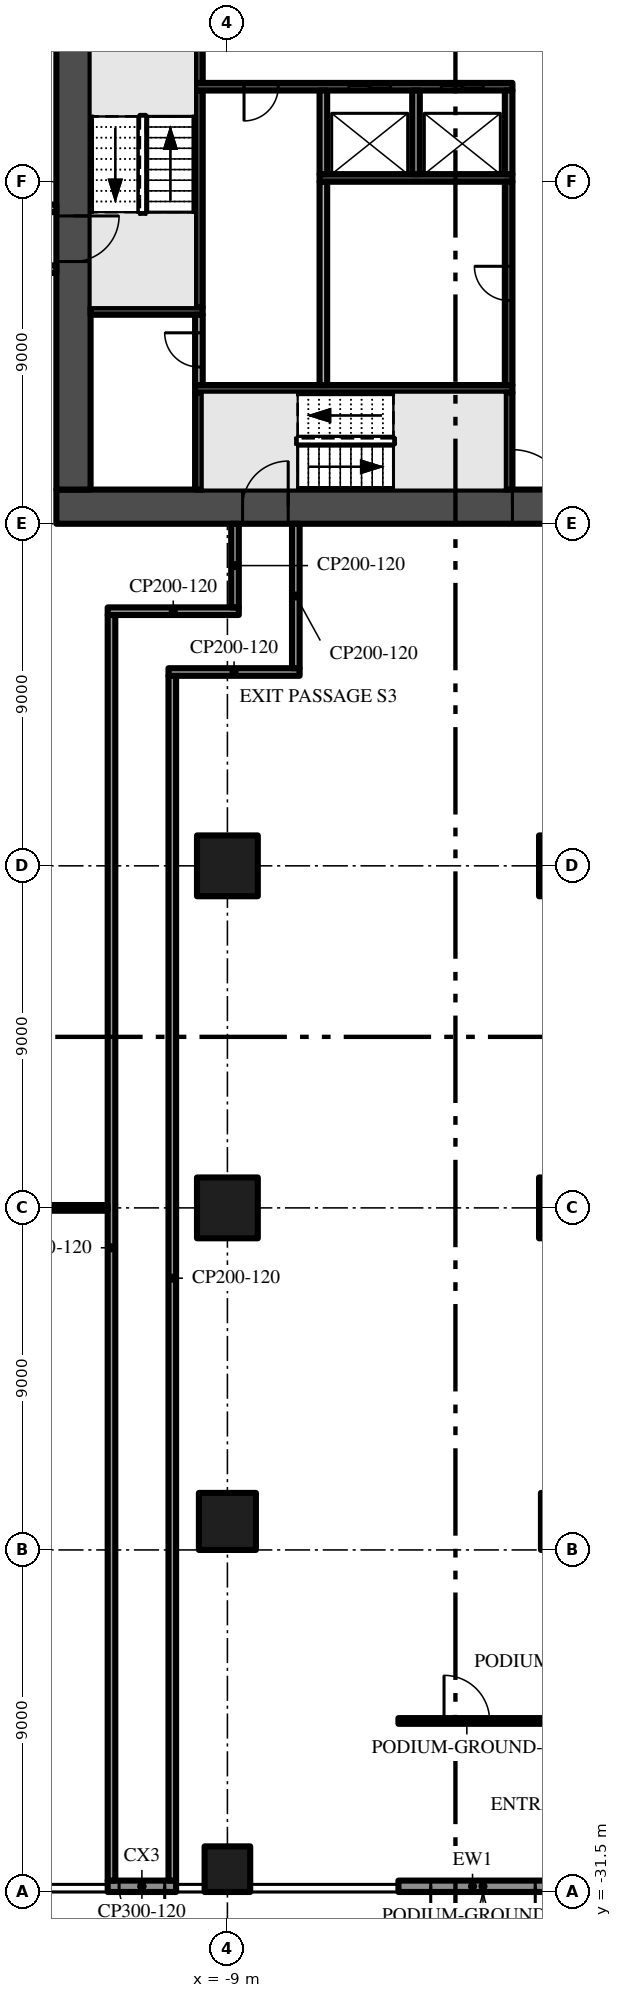
"""IFC4 building model, lengths in metres.
Left out: names, types, materials, properties, quantities, classifications, styles, units other than length and angle.
Written with IfcOpenShell. Run it as: python <this file> out.ifc"""

import sys

from ifc_helpers import new_model, si_unit, direction, frame, frame_2d, origin, origin_2d, place, context, subcontext, project, spatial, rectangle, extrude, element, fill, save


model = new_model("IFC4")
c1 = context("Model", 3, precision=1e-05, world=origin(), true_north=direction((0.0, 1.0)))
c2 = subcontext(c1, "Body", "Model", "MODEL_VIEW")
j1 = project(units=[si_unit("LENGTHUNIT", "METRE"), si_unit("PLANEANGLEUNIT", "RADIAN")], contexts=[c1])
p1 = place(None, origin())
s1 = spatial("IfcSite", under=j1, at=p1, CompositionType="ELEMENT")
p2 = place(p1, origin())
s2 = spatial("IfcBuilding", under=s1, at=p2, CompositionType="ELEMENT")
p3 = place(p2, origin())
s3 = spatial("IfcBuildingStorey", under=s2, at=p3, CompositionType="ELEMENT", Elevation=0.0)
p4 = place(p3, frame((-13.5, 4.95, -2.2), z_axis=(0.0, 0.0, 1.0), x_axis=(1.0, 0.0, 0.0)))
e1 = element("IfcWall", 1, at=p4, inside=s3, PredefinedType="SHEAR", context=c2, shape_type="SweptSolid", body=[
    extrude(rectangle(XDim=27.0, YDim=0.9, at=frame_2d((13.5, 0.0))), origin(), (0.0, 0.0, 1.0), 7.8),
])
p5 = place(p4, frame((12.0, 0.0, 2.2)))
e2 = element("IfcOpeningElement", 2, at=p5, cuts=e1, PredefinedType="OPENING", context=c2, shape_type="SweptSolid", body=[
    extrude(rectangle(XDim=3.0, YDim=2.4, at=frame_2d((1.5, 1.2))), frame((0.0, 0.46, 0.0), z_axis=(0.0, -1.0, 0.0), x_axis=(1.0, 0.0, 0.0)), (0.0, 0.0, 1.0), 0.92),
])
p6 = place(p4, frame((4.9, 0.0, 2.2)))
e3 = element("IfcOpeningElement", 3, at=p6, cuts=e1, PredefinedType="OPENING", context=c2, shape_type="SweptSolid", body=[
    extrude(rectangle(XDim=1.2, YDim=2.2, at=frame_2d((0.6, 1.1))), frame((0.0, 0.46, 0.0), z_axis=(0.0, -1.0, 0.0), x_axis=(1.0, 0.0, 0.0)), (0.0, 0.0, 1.0), 0.92),
])
p7 = place(p4, frame((20.75, 0.0, 2.2)))
e4 = element("IfcOpeningElement", 4, at=p7, cuts=e1, PredefinedType="OPENING", context=c2, shape_type="SweptSolid", body=[
    extrude(rectangle(XDim=1.5, YDim=2.2, at=frame_2d((0.75, 1.1))), frame((0.0, 0.46, 0.0), z_axis=(0.0, -1.0, 0.0), x_axis=(1.0, 0.0, 0.0)), (0.0, 0.0, 1.0), 0.92),
])
p8 = place(p4, frame((17.4, 0.0, 2.2)))
e5 = element("IfcOpeningElement", 5, at=p8, cuts=e1, PredefinedType="OPENING", context=c2, shape_type="SweptSolid", body=[
    extrude(rectangle(XDim=1.2, YDim=2.2, at=frame_2d((0.6, 1.1))), frame((0.0, 0.46, 0.0), z_axis=(0.0, -1.0, 0.0), x_axis=(1.0, 0.0, 0.0)), (0.0, 0.0, 1.0), 0.92),
])
p9 = place(p3, frame((-13.05, 21.6, -2.2), z_axis=(0.0, 0.0, 1.0), x_axis=(0.0, -1.0, 0.0)))
e6 = element("IfcWall", 6, at=p9, inside=s3, PredefinedType="SHEAR", context=c2, shape_type="SweptSolid", body=[
    extrude(rectangle(XDim=16.2, YDim=0.9, at=frame_2d((8.1, 0.0))), origin(), (0.0, 0.0, 1.0), 7.8),
])
p10 = place(p9, frame((9.0, 0.0, 2.2)))
e7 = element("IfcOpeningElement", 7, at=p10, cuts=e6, PredefinedType="OPENING", context=c2, shape_type="SweptSolid", body=[
    extrude(rectangle(XDim=1.2, YDim=2.2, at=frame_2d((0.6, 1.1))), frame((0.0, 0.46, 0.0), z_axis=(0.0, -1.0, 0.0), x_axis=(1.0, 0.0, 0.0)), (0.0, 0.0, 1.0), 0.92),
])
p11 = place(p3, frame((-9.0, -30.9, 0.0), z_axis=(0.0, 0.0, 1.0), x_axis=(1.0, 0.0, 0.0)))
e8 = element("IfcColumn", 8, at=p11, inside=s3, PredefinedType="COLUMN", context=c2, shape_type="SweptSolid", body=[
    extrude(rectangle(XDim=1.2, YDim=1.2, at=origin_2d()), origin(), (0.0, 0.0, 1.0), 5.6),
])
p12 = place(p3, frame((-9.0, -13.5, 0.0), z_axis=(0.0, 0.0, 1.0), x_axis=(1.0, 0.0, 0.0)))
e9 = element("IfcColumn", 9, at=p12, inside=s3, PredefinedType="COLUMN", context=c2, shape_type="SweptSolid", body=[
    extrude(rectangle(XDim=1.6, YDim=1.6, at=origin_2d()), origin(), (0.0, 0.0, 1.0), 5.6),
])
p13 = place(p3, frame((-9.0, -21.75, 0.0), z_axis=(0.0, 0.0, 1.0), x_axis=(1.0, 0.0, 0.0)))
e10 = element("IfcColumn", 10, at=p13, inside=s3, PredefinedType="COLUMN", context=c2, shape_type="SweptSolid", body=[
    extrude(rectangle(XDim=1.5, YDim=1.5, at=origin_2d()), origin(), (0.0, 0.0, 1.0), 5.6),
])
for number, where, z_axis, x_axis in (
    (11, (-9.0, -4.5, 0.0), (0.0, 0.0, 1.0), (1.0, 0.0, 0.0)),
    (12, (0.0, -13.5, 0.0), (0.0, 0.0, 1.0), (1.0, 0.0, 0.0)),
):
    element("IfcColumn", number, at=place(p3, frame(where, z_axis=z_axis, x_axis=x_axis)), inside=s3, PredefinedType="COLUMN", context=c2, shape_type="SweptSolid", body=[
        extrude(rectangle(XDim=1.6, YDim=1.6, at=origin_2d()), origin(), (0.0, 0.0, 1.0), 5.6),
    ])
p14 = place(p3, frame((0.0, -21.75, 0.0), z_axis=(0.0, 0.0, 1.0), x_axis=(1.0, 0.0, 0.0)))
e13 = element("IfcColumn", 13, at=p14, inside=s3, PredefinedType="COLUMN", context=c2, shape_type="SweptSolid", body=[
    extrude(rectangle(XDim=1.5, YDim=1.5, at=origin_2d()), origin(), (0.0, 0.0, 1.0), 5.6),
])
p15 = place(p3, frame((0.0, -4.5, 0.0), z_axis=(0.0, 0.0, 1.0), x_axis=(1.0, 0.0, 0.0)))
e14 = element("IfcColumn", 14, at=p15, inside=s3, PredefinedType="COLUMN", context=c2, shape_type="SweptSolid", body=[
    extrude(rectangle(XDim=1.6, YDim=1.6, at=origin_2d()), origin(), (0.0, 0.0, 1.0), 5.6),
])
p16 = place(p3, frame((-0.6, -31.35, 0.0), z_axis=(0.0, 0.0, 1.0), x_axis=(-1.0, 0.0, 0.0)))
e15 = element("IfcWall", 15, at=p16, inside=s3, PredefinedType="SOLIDWALL", context=c2, shape_type="SweptSolid", body=[
    extrude(rectangle(XDim=3.9, YDim=0.3, at=frame_2d((1.95, 0.0))), origin(), (0.0, 0.0, 1.0), 5.6),
])
p17 = place(p16, frame((0.3, 0.0, 0.0)))
e16 = element("IfcOpeningElement", 16, at=p17, cuts=e15, PredefinedType="OPENING", context=c2, shape_type="SweptSolid", body=[
    extrude(rectangle(XDim=2.75, YDim=2.7, at=frame_2d((1.375, 1.35))), frame((0.0, 0.16, 0.0), z_axis=(0.0, -1.0, 0.0), x_axis=(1.0, 0.0, 0.0)), (0.0, 0.0, 1.0), 0.32),
])
p18 = place(p3, frame((-12.6, 10.1, -0.4), z_axis=(0.0, 0.0, 1.0), x_axis=(1.0, 0.0, 0.0)))
e17 = element("IfcWall", 17, at=p18, inside=s3, PredefinedType="SHEAR", context=c2, shape_type="SweptSolid", body=[
    extrude(rectangle(XDim=2.95, YDim=0.2, at=frame_2d((1.475, 0.0))), origin(), (0.0, 0.0, 1.0), 6.0),
])
p19 = place(p3, frame((-9.75, 5.4, -0.4), z_axis=(0.0, 0.0, 1.0), x_axis=(0.0, 1.0, 0.0)))
e18 = element("IfcWall", 18, at=p19, inside=s3, PredefinedType="SHEAR", context=c2, shape_type="SweptSolid", body=[
    extrude(rectangle(XDim=2.55, YDim=0.2, at=frame_2d((1.275, 0.0))), origin(), (0.0, 0.0, 1.0), 6.0),
])
p20 = place(p3, frame((-9.85, 8.05, -0.4), z_axis=(0.0, 0.0, 1.0), x_axis=(1.0, 0.0, 0.0)))
e19 = element("IfcWall", 19, at=p20, inside=s3, PredefinedType="SHEAR", context=c2, shape_type="SweptSolid", body=[
    extrude(rectangle(XDim=8.35, YDim=0.2, at=frame_2d((4.175, 0.0))), origin(), (0.0, 0.0, 1.0), 6.0),
])
p21 = place(p3, frame((-9.75, 8.15, 0.0), z_axis=(0.0, 0.0, 1.0), x_axis=(0.0, 1.0, 0.0)))
e20 = element("IfcWall", 20, at=p21, inside=s3, PredefinedType="PARTITIONING", context=c2, shape_type="SweptSolid", body=[
    extrude(rectangle(XDim=1.85, YDim=0.2, at=frame_2d((0.925, 0.0))), origin(), (0.0, 0.0, 1.0), 5.6),
])
p22 = place(p21, frame((0.475, 0.0, 0.0)))
e21 = element("IfcOpeningElement", 21, at=p22, cuts=e20, PredefinedType="OPENING", context=c2, shape_type="SweptSolid", body=[
    extrude(rectangle(XDim=0.9, YDim=2.1, at=frame_2d((0.45, 1.05))), frame((0.0, 0.11, 0.0), z_axis=(0.0, -1.0, 0.0), x_axis=(1.0, 0.0, 0.0)), (0.0, 0.0, 1.0), 0.22),
])
p23 = place(p3, frame((-9.75, 10.2, -0.4), z_axis=(0.0, 0.0, 1.0), x_axis=(0.0, 1.0, 0.0)))
e22 = element("IfcWall", 22, at=p23, inside=s3, PredefinedType="SHEAR", context=c2, shape_type="SweptSolid", body=[
    extrude(rectangle(XDim=5.7, YDim=0.2, at=frame_2d((2.85, 0.0))), origin(), (0.0, 0.0, 1.0), 6.0),
])
p24 = place(p3, frame((-1.5, 16.0, -0.4), z_axis=(0.0, 0.0, 1.0), x_axis=(-1.0, 0.0, 0.0)))
e23 = element("IfcWall", 23, at=p24, inside=s3, PredefinedType="SHEAR", context=c2, shape_type="SweptSolid", body=[
    extrude(rectangle(XDim=8.35, YDim=0.2, at=frame_2d((4.175, 0.0))), origin(), (0.0, 0.0, 1.0), 6.0),
])
p25 = place(p24, frame((3.206, 0.0, 0.4)))
e24 = element("IfcOpeningElement", 24, at=p25, cuts=e23, PredefinedType="OPENING", context=c2, shape_type="SweptSolid", body=[
    extrude(rectangle(XDim=1.1, YDim=2.1, at=frame_2d((0.55, 1.05))), frame((0.0, 0.11, 0.0), z_axis=(0.0, -1.0, 0.0), x_axis=(1.0, 0.0, 0.0)), (0.0, 0.0, 1.0), 0.22),
])
p26 = place(p24, frame((0.769, 0.0, 0.4)))
e25 = element("IfcOpeningElement", 25, at=p26, cuts=e23, PredefinedType="OPENING", context=c2, shape_type="SweptSolid", body=[
    extrude(rectangle(XDim=1.1, YDim=2.1, at=frame_2d((0.55, 1.05))), frame((0.0, 0.11, 0.0), z_axis=(0.0, -1.0, 0.0), x_axis=(1.0, 0.0, 0.0)), (0.0, 0.0, 1.0), 0.22),
])
p27 = place(p24, frame((6.162, 0.0, 0.4)))
e26 = element("IfcOpeningElement", 26, at=p27, cuts=e23, PredefinedType="OPENING", context=c2, shape_type="SweptSolid", body=[
    extrude(rectangle(XDim=0.9, YDim=2.1, at=frame_2d((0.45, 1.05))), frame((0.0, 0.11, 0.0), z_axis=(0.0, -1.0, 0.0), x_axis=(1.0, 0.0, 0.0)), (0.0, 0.0, 1.0), 0.22),
])
p28 = place(p3, frame((-9.75, 16.1, -0.4), z_axis=(0.0, 0.0, 1.0), x_axis=(0.0, 1.0, 0.0)))
e27 = element("IfcWall", 27, at=p28, inside=s3, PredefinedType="SHEAR", context=c2, shape_type="SweptSolid", body=[
    extrude(rectangle(XDim=1.5, YDim=0.2, at=frame_2d((0.75, 0.0))), origin(), (0.0, 0.0, 1.0), 6.0),
])
p29 = place(p3, frame((-6.475, 8.15, 0.0), z_axis=(0.0, 0.0, 1.0), x_axis=(0.0, 1.0, 0.0)))
e28 = element("IfcWall", 28, at=p29, inside=s3, PredefinedType="PARTITIONING", context=c2, shape_type="SweptSolid", body=[
    extrude(rectangle(XDim=5.35, YDim=0.2, at=frame_2d((2.675, 0.0))), origin(), (0.0, 0.0, 1.0), 5.6),
])
p30 = place(p3, frame((-6.575, 13.6, -0.4), z_axis=(0.0, 0.0, 1.0), x_axis=(1.0, 0.0, 0.0)))
e29 = element("IfcWall", 29, at=p30, inside=s3, PredefinedType="SHEAR", context=c2, shape_type="SweptSolid", body=[
    extrude(rectangle(XDim=5.075, YDim=0.2, at=frame_2d((2.538, 0.0))), origin(), (0.0, 0.0, 1.0), 6.0),
])
for number, where, z_axis, x_axis in (
    (30, (-6.475, 13.7, -0.4), (0.0, 0.0, 1.0), (0.0, 1.0, 0.0)),
    (31, (-4.037, 13.7, -0.4), (0.0, 0.0, 1.0), (0.0, 1.0, 0.0)),
):
    element("IfcWall", number, at=place(p3, frame(where, z_axis=z_axis, x_axis=x_axis)), inside=s3, PredefinedType="PARTITIONING", context=c2, shape_type="SweptSolid", body=[
        extrude(rectangle(XDim=2.2, YDim=0.2, at=frame_2d((1.1, 0.0))), origin(), (0.0, 0.0, 1.0), 6.0),
    ])
p31 = place(p3, frame((-1.6, 5.4, -0.4), z_axis=(0.0, 0.0, 1.0), x_axis=(0.0, 1.0, 0.0)))
e32 = element("IfcWall", 32, at=p31, inside=s3, PredefinedType="SHEAR", context=c2, shape_type="SweptSolid", body=[
    extrude(rectangle(XDim=2.55, YDim=0.2, at=frame_2d((1.275, 0.0))), origin(), (0.0, 0.0, 1.0), 6.0),
])
p32 = place(p3, frame((-1.6, 8.15, -0.4), z_axis=(0.0, 0.0, 1.0), x_axis=(0.0, 1.0, 0.0)))
e33 = element("IfcWall", 33, at=p32, inside=s3, PredefinedType="SHEAR", context=c2, shape_type="SweptSolid", body=[
    extrude(rectangle(XDim=5.35, YDim=0.2, at=frame_2d((2.675, 0.0))), origin(), (0.0, 0.0, 1.0), 6.0),
])
p33 = place(p32, frame((2.225, 0.0, 0.4)))
e34 = element("IfcOpeningElement", 34, at=p33, cuts=e33, PredefinedType="OPENING", context=c2, shape_type="SweptSolid", body=[
    extrude(rectangle(XDim=0.9, YDim=2.1, at=frame_2d((0.45, 1.05))), frame((0.0, 0.11, 0.0), z_axis=(0.0, -1.0, 0.0), x_axis=(1.0, 0.0, 0.0)), (0.0, 0.0, 1.0), 0.22),
])
p34 = place(p3, frame((-1.6, 13.7, -0.4), z_axis=(0.0, 0.0, 1.0), x_axis=(0.0, 1.0, 0.0)))
e35 = element("IfcWall", 35, at=p34, inside=s3, PredefinedType="PARTITIONING", context=c2, shape_type="SweptSolid", body=[
    extrude(rectangle(XDim=2.2, YDim=0.2, at=frame_2d((1.1, 0.0))), origin(), (0.0, 0.0, 1.0), 6.0),
])
p35 = place(p3, frame((-35.7, 11.2, 0.0), z_axis=(0.0, 0.0, 1.0), x_axis=(1.0, 0.0, 0.0)))
e36 = element("IfcWall", 36, at=p35, inside=s3, PredefinedType="PARTITIONING", context=c2, shape_type="SweptSolid", body=[
    extrude(rectangle(XDim=22.2, YDim=0.2, at=frame_2d((11.1, 0.0))), origin(), (0.0, 0.0, 1.0), 5.6),
])
p36 = place(p3, frame((-17.2, 12.8, 0.0), z_axis=(0.0, 0.0, 1.0), x_axis=(1.0, 0.0, 0.0)))
e37 = element("IfcWall", 37, at=p36, inside=s3, PredefinedType="PARTITIONING", context=c2, shape_type="SweptSolid", body=[
    extrude(rectangle(XDim=3.7, YDim=0.2, at=frame_2d((1.85, 0.0))), origin(), (0.0, 0.0, 1.0), 5.6),
])
p37 = place(p3, frame((-12.05, -31.2, 0.0), z_axis=(0.0, 0.0, 1.0), x_axis=(0.0, 1.0, 0.0)))
e38 = element("IfcWall", 38, at=p37, inside=s3, PredefinedType="PARTITIONING", context=c2, shape_type="SweptSolid", body=[
    extrude(rectangle(XDim=33.3, YDim=0.2, at=frame_2d((16.65, 0.0))), origin(), (0.0, 0.0, 1.0), 5.6),
])
p38 = place(p3, frame((-12.15, 2.2, 0.0), z_axis=(0.0, 0.0, 1.0), x_axis=(1.0, 0.0, 0.0)))
e39 = element("IfcWall", 39, at=p38, inside=s3, PredefinedType="PARTITIONING", context=c2, shape_type="SweptSolid", body=[
    extrude(rectangle(XDim=3.45, YDim=0.2, at=frame_2d((1.725, 0.0))), origin(), (0.0, 0.0, 1.0), 5.6),
])
p39 = place(p3, frame((-10.45, -31.2, 0.0), z_axis=(0.0, 0.0, 1.0), x_axis=(0.0, 1.0, 0.0)))
e40 = element("IfcWall", 40, at=p39, inside=s3, PredefinedType="PARTITIONING", context=c2, shape_type="SweptSolid", body=[
    extrude(rectangle(XDim=31.7, YDim=0.2, at=frame_2d((15.85, 0.0))), origin(), (0.0, 0.0, 1.0), 5.6),
])
p40 = place(p3, frame((-10.55, 0.6, 0.0), z_axis=(0.0, 0.0, 1.0), x_axis=(1.0, 0.0, 0.0)))
e41 = element("IfcWall", 41, at=p40, inside=s3, PredefinedType="PARTITIONING", context=c2, shape_type="SweptSolid", body=[
    extrude(rectangle(XDim=3.45, YDim=0.2, at=frame_2d((1.725, 0.0))), origin(), (0.0, 0.0, 1.0), 5.6),
])
p41 = place(p3, frame((-8.8, 2.3, 0.0), z_axis=(0.0, 0.0, 1.0), x_axis=(0.0, 1.0, 0.0)))
e42 = element("IfcWall", 42, at=p41, inside=s3, PredefinedType="PARTITIONING", context=c2, shape_type="SweptSolid", body=[
    extrude(rectangle(XDim=2.2, YDim=0.2, at=frame_2d((1.1, 0.0))), origin(), (0.0, 0.0, 1.0), 5.6),
])
p42 = place(p3, frame((-7.2, 0.7, 0.0), z_axis=(0.0, 0.0, 1.0), x_axis=(0.0, 1.0, 0.0)))
e43 = element("IfcWall", 43, at=p42, inside=s3, PredefinedType="PARTITIONING", context=c2, shape_type="SweptSolid", body=[
    extrude(rectangle(XDim=3.8, YDim=0.2, at=frame_2d((1.9, 0.0))), origin(), (0.0, 0.0, 1.0), 5.6),
])
p43 = place(p3, frame((-10.35, -31.35, 0.0), z_axis=(0.0, 0.0, 1.0), x_axis=(-1.0, 0.0, 0.0)))
e44 = element("IfcWall", 44, at=p43, inside=s3, PredefinedType="PARTITIONING", context=c2, shape_type="SweptSolid", body=[
    extrude(rectangle(XDim=1.8, YDim=0.3, at=frame_2d((0.9, 0.0))), origin(), (0.0, 0.0, 1.0), 5.6),
])
p44 = place(p43, frame((0.3, 0.0, 0.0)))
e45 = element("IfcOpeningElement", 45, at=p44, cuts=e44, PredefinedType="OPENING", context=c2, shape_type="SweptSolid", body=[
    extrude(rectangle(XDim=1.2, YDim=2.2, at=frame_2d((0.6, 1.1))), frame((0.0, 0.16, 0.0), z_axis=(0.0, -1.0, 0.0), x_axis=(1.0, 0.0, 0.0)), (0.0, 0.0, 1.0), 0.32),
])
p45 = place(p3, frame((-4.5, -27.0, 0.0), z_axis=(0.0, 0.0, 1.0), x_axis=(1.0, 0.0, 0.0)))
e46 = element("IfcWall", 46, at=p45, inside=s3, PredefinedType="PARTITIONING", context=c2, shape_type="SweptSolid", body=[
    extrude(rectangle(XDim=9.0, YDim=0.15, at=frame_2d((4.5, 0.0))), origin(), (0.0, 0.0, 1.0), 5.6),
])
p46 = place(p45, frame((1.2, 0.0, 0.0)))
e47 = element("IfcOpeningElement", 47, at=p46, cuts=e46, PredefinedType="OPENING", context=c2, shape_type="SweptSolid", body=[
    extrude(rectangle(XDim=1.2, YDim=2.4, at=frame_2d((0.6, 1.2))), frame((0.0, 0.085, 0.0), z_axis=(0.0, -1.0, 0.0), x_axis=(1.0, 0.0, 0.0)), (0.0, 0.0, 1.0), 0.17),
])
p47 = place(p45, frame((3.9, 0.0, 0.0)))
e48 = element("IfcOpeningElement", 48, at=p47, cuts=e46, PredefinedType="OPENING", context=c2, shape_type="SweptSolid", body=[
    extrude(rectangle(XDim=1.2, YDim=2.4, at=frame_2d((0.6, 1.2))), frame((0.0, 0.085, 0.0), z_axis=(0.0, -1.0, 0.0), x_axis=(1.0, 0.0, 0.0)), (0.0, 0.0, 1.0), 0.17),
])
p48 = place(p3, frame((-17.2, -13.5, 0.0), z_axis=(0.0, 0.0, 1.0), x_axis=(1.0, 0.0, 0.0)))
e49 = element("IfcWall", 49, at=p48, inside=s3, PredefinedType="PARTITIONING", context=c2, shape_type="SweptSolid", body=[
    extrude(rectangle(XDim=5.05, YDim=0.15, at=frame_2d((2.525, 0.0))), origin(), (0.0, 0.0, 1.0), 5.6),
])
p49 = place(p17, origin())
e50 = element("IfcDoor", 50, at=p49, inside=s3, OperationType="SINGLE_SWING_LEFT", PredefinedType="DOOR", context=c2, shape_type="SweptSolid", body=[
    extrude(rectangle(XDim=2.75, YDim=2.7, at=frame_2d((1.375, 1.35))), frame((0.0, 0.025, 0.0), z_axis=(0.0, -1.0, 0.0), x_axis=(1.0, 0.0, 0.0)), (0.0, 0.0, 1.0), 0.05),
])
fill(e16, e50)
p50 = place(p5, frame((3.0, 0.0, 0.0), z_axis=(0.0, 0.0, 1.0), x_axis=(-1.0, 0.0, 0.0)))
e51 = element("IfcDoor", 51, at=p50, inside=s3, OperationType="DOUBLE_DOOR_SINGLE_SWING", PredefinedType="DOOR", context=c2, shape_type="SweptSolid", body=[
    extrude(rectangle(XDim=3.0, YDim=2.4, at=frame_2d((1.5, 1.2))), frame((0.0, 0.025, 0.0), z_axis=(0.0, -1.0, 0.0), x_axis=(1.0, 0.0, 0.0)), (0.0, 0.0, 1.0), 0.05),
])
fill(e2, e51)
p51 = place(p10, frame((1.2, 0.0, 0.0), z_axis=(0.0, 0.0, 1.0), x_axis=(-1.0, 0.0, 0.0)))
e52 = element("IfcDoor", 52, at=p51, inside=s3, OperationType="SINGLE_SWING_RIGHT", PredefinedType="DOOR", context=c2, shape_type="SweptSolid", body=[
    extrude(rectangle(XDim=1.2, YDim=2.2, at=frame_2d((0.6, 1.1))), frame((0.0, 0.025, 0.0), z_axis=(0.0, -1.0, 0.0), x_axis=(1.0, 0.0, 0.0)), (0.0, 0.0, 1.0), 0.05),
])
fill(e7, e52)
p52 = place(p6, frame((1.2, 0.0, 0.0), z_axis=(0.0, 0.0, 1.0), x_axis=(-1.0, 0.0, 0.0)))
e53 = element("IfcDoor", 53, at=p52, inside=s3, OperationType="SINGLE_SWING_LEFT", PredefinedType="DOOR", context=c2, shape_type="SweptSolid", body=[
    extrude(rectangle(XDim=1.2, YDim=2.2, at=frame_2d((0.6, 1.1))), frame((0.0, 0.025, 0.0), z_axis=(0.0, -1.0, 0.0), x_axis=(1.0, 0.0, 0.0)), (0.0, 0.0, 1.0), 0.05),
])
fill(e3, e53)
p53 = place(p25, origin())
e54 = element("IfcDoor", 54, at=p53, inside=s3, OperationType="SLIDING_TO_LEFT", PredefinedType="DOOR", context=c2, shape_type="SweptSolid", body=[
    extrude(rectangle(XDim=1.1, YDim=2.1, at=frame_2d((0.55, 1.05))), frame((0.0, 0.025, 0.0), z_axis=(0.0, -1.0, 0.0), x_axis=(1.0, 0.0, 0.0)), (0.0, 0.0, 1.0), 0.05),
])
fill(e24, e54)
p54 = place(p26, origin())
e55 = element("IfcDoor", 55, at=p54, inside=s3, OperationType="SLIDING_TO_LEFT", PredefinedType="DOOR", context=c2, shape_type="SweptSolid", body=[
    extrude(rectangle(XDim=1.1, YDim=2.1, at=frame_2d((0.55, 1.05))), frame((0.0, 0.025, 0.0), z_axis=(0.0, -1.0, 0.0), x_axis=(1.0, 0.0, 0.0)), (0.0, 0.0, 1.0), 0.05),
])
fill(e25, e55)
p55 = place(p33, origin())
e56 = element("IfcDoor", 56, at=p55, inside=s3, OperationType="SINGLE_SWING_RIGHT", PredefinedType="DOOR", context=c2, shape_type="SweptSolid", body=[
    extrude(rectangle(XDim=0.9, YDim=2.1, at=frame_2d((0.45, 1.05))), frame((0.0, 0.025, 0.0), z_axis=(0.0, -1.0, 0.0), x_axis=(1.0, 0.0, 0.0)), (0.0, 0.0, 1.0), 0.05),
])
fill(e34, e56)
p56 = place(p27, origin())
e57 = element("IfcDoor", 57, at=p56, inside=s3, OperationType="SINGLE_SWING_RIGHT", PredefinedType="DOOR", context=c2, shape_type="SweptSolid", body=[
    extrude(rectangle(XDim=0.9, YDim=2.1, at=frame_2d((0.45, 1.05))), frame((0.0, 0.025, 0.0), z_axis=(0.0, -1.0, 0.0), x_axis=(1.0, 0.0, 0.0)), (0.0, 0.0, 1.0), 0.05),
])
fill(e26, e57)
p57 = place(p22, origin())
e58 = element("IfcDoor", 58, at=p57, inside=s3, OperationType="SINGLE_SWING_RIGHT", PredefinedType="DOOR", context=c2, shape_type="SweptSolid", body=[
    extrude(rectangle(XDim=0.9, YDim=2.1, at=frame_2d((0.45, 1.05))), frame((0.0, 0.025, 0.0), z_axis=(0.0, -1.0, 0.0), x_axis=(1.0, 0.0, 0.0)), (0.0, 0.0, 1.0), 0.05),
])
fill(e21, e58)
p58 = place(p44, origin())
e59 = element("IfcDoor", 59, at=p58, inside=s3, OperationType="SINGLE_SWING_LEFT", PredefinedType="DOOR", context=c2, shape_type="SweptSolid", body=[
    extrude(rectangle(XDim=1.2, YDim=2.2, at=frame_2d((0.6, 1.1))), frame((0.0, 0.025, 0.0), z_axis=(0.0, -1.0, 0.0), x_axis=(1.0, 0.0, 0.0)), (0.0, 0.0, 1.0), 0.05),
])
fill(e45, e59)
p59 = place(p46, origin())
e60 = element("IfcDoor", 60, at=p59, inside=s3, OperationType="SINGLE_SWING_LEFT", PredefinedType="DOOR", context=c2, shape_type="SweptSolid", body=[
    extrude(rectangle(XDim=1.2, YDim=2.4, at=frame_2d((0.6, 1.2))), frame((0.0, 0.025, 0.0), z_axis=(0.0, -1.0, 0.0), x_axis=(1.0, 0.0, 0.0)), (0.0, 0.0, 1.0), 0.05),
])
fill(e47, e60)
save(model, sys.argv[1])
